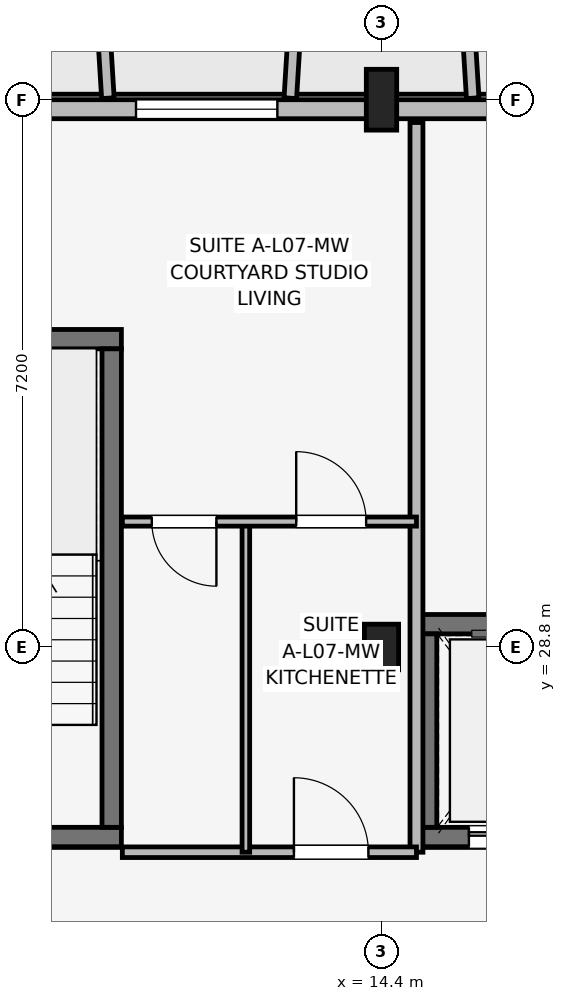
"""IFC4 building model, lengths in metres.
Left out: names, types, materials, properties, quantities, classifications, styles, units other than length and angle.
Written with IfcOpenShell. Run it as: python <this file> out.ifc"""

import sys

from ifc_helpers import new_model, si_unit, direction, frame, frame_2d, origin, origin_2d, place, context, subcontext, project, spatial, rectangle, extrude, element, fill, save


model = new_model("IFC4")
c1 = context("Model", 3, precision=1e-05, world=origin(), true_north=direction((0.0, 1.0)))
c2 = subcontext(c1, "Body", "Model", "MODEL_VIEW")
j1 = project(units=[si_unit("LENGTHUNIT", "METRE"), si_unit("PLANEANGLEUNIT", "RADIAN")], contexts=[c1])
p1 = place(None, origin())
s1 = spatial("IfcSite", under=j1, at=p1, CompositionType="ELEMENT")
p2 = place(p1, origin())
s2 = spatial("IfcBuilding", under=s1, at=p2, CompositionType="ELEMENT")
p3 = place(p2, frame((0.0, 0.0, 24.45)))
s3 = spatial("IfcBuildingStorey", under=s2, at=p3, CompositionType="ELEMENT", Elevation=24.45)
p4 = place(p3, frame((14.4, 28.8, 0.0), z_axis=(0.0, 0.0, 1.0), x_axis=(1.0, 0.0, 0.0)))
e1 = element("IfcColumn", 1, at=p4, inside=s3, PredefinedType="COLUMN", context=c2, shape_type="SweptSolid", body=[
    extrude(rectangle(XDim=0.45, YDim=0.6, at=origin_2d()), origin(), (0.0, 0.0, 1.0), 3.15),
])
p5 = place(p3, frame((14.4, 36.0, 0.0), z_axis=(0.0, 0.0, 1.0), x_axis=(1.0, 0.0, 0.0)))
e2 = element("IfcColumn", 2, at=p5, inside=s3, PredefinedType="COLUMN", context=c2, shape_type="SweptSolid", body=[
    extrude(rectangle(XDim=0.4, YDim=0.8, at=origin_2d()), origin(), (0.0, 0.0, 1.0), 3.15),
])
p6 = place(p3, frame((7.673, 26.3, 0.0), z_axis=(0.0, 0.0, 1.0), x_axis=(1.0, 0.0, 0.0)))
e3 = element("IfcWall", 3, at=p6, inside=s3, PredefinedType="SHEAR", context=c2, shape_type="SweptSolid", body=[
    extrude(rectangle(XDim=3.305, YDim=0.255, at=frame_2d((1.652, 0.0))), origin(), (0.0, 0.0, 1.0), 3.15),
])
p7 = place(p6, frame((2.177, 0.0, 0.0), z_axis=(0.0, 0.0, 1.0), x_axis=(-1.0, 0.0, 0.0)))
e4 = element("IfcOpeningElement", 4, at=p7, cuts=e3, PredefinedType="OPENING", context=c2, shape_type="SweptSolid", body=[
    extrude(rectangle(XDim=1.05, YDim=2.12, at=frame_2d((0.525, 1.06))), frame((0.0, 0.137, 0.0), z_axis=(0.0, -1.0, 0.0), x_axis=(1.0, 0.0, 0.0)), (0.0, 0.0, 1.0), 0.275),
])
p8 = place(p3, frame((7.673, 32.85, 0.0), z_axis=(0.0, 0.0, 1.0), x_axis=(1.0, 0.0, 0.0)))
e5 = element("IfcWall", 5, at=p8, inside=s3, PredefinedType="SHEAR", context=c2, shape_type="SweptSolid", body=[
    extrude(rectangle(XDim=3.305, YDim=0.255, at=frame_2d((1.652, 0.0))), origin(), (0.0, 0.0, 1.0), 3.15),
])
p9 = place(p3, frame((10.85, 26.427, 0.0), z_axis=(0.0, 0.0, 1.0), x_axis=(0.0, 1.0, 0.0)))
e6 = element("IfcWall", 6, at=p9, inside=s3, PredefinedType="SHEAR", context=c2, shape_type="SweptSolid", body=[
    extrude(rectangle(XDim=6.295, YDim=0.255, at=frame_2d((3.147, 0.0))), origin(), (0.0, 0.0, 1.0), 3.15),
])
p10 = place(p3, frame((14.873, 26.3, 0.0), z_axis=(0.0, 0.0, 1.0), x_axis=(1.0, 0.0, 0.0)))
e7 = element("IfcWall", 7, at=p10, inside=s3, PredefinedType="SHEAR", context=c2, shape_type="SweptSolid", body=[
    extrude(rectangle(XDim=2.455, YDim=0.255, at=frame_2d((1.228, 0.0))), origin(), (0.0, 0.0, 1.0), 3.15),
])
p11 = place(p10, frame((0.677, 0.0, 0.0)))
e8 = element("IfcOpeningElement", 8, at=p11, cuts=e7, PredefinedType="OPENING", context=c2, shape_type="SweptSolid", body=[
    extrude(rectangle(XDim=1.1, YDim=2.15, at=frame_2d((0.55, 1.075))), frame((0.0, 0.137, 0.0), z_axis=(0.0, -1.0, 0.0), x_axis=(1.0, 0.0, 0.0)), (0.0, 0.0, 1.0), 0.275),
])
p12 = place(p3, frame((14.873, 29.1, 0.0), z_axis=(0.0, 0.0, 1.0), x_axis=(1.0, 0.0, 0.0)))
e9 = element("IfcWall", 9, at=p12, inside=s3, PredefinedType="SHEAR", context=c2, shape_type="SweptSolid", body=[
    extrude(rectangle(XDim=2.455, YDim=0.255, at=frame_2d((1.228, 0.0))), origin(), (0.0, 0.0, 1.0), 3.15),
])
p13 = place(p3, frame((15.0, 26.427, 0.0), z_axis=(0.0, 0.0, 1.0), x_axis=(0.0, 1.0, 0.0)))
e10 = element("IfcWall", 10, at=p13, inside=s3, PredefinedType="SHEAR", context=c2, shape_type="SweptSolid", body=[
    extrude(rectangle(XDim=2.545, YDim=0.255, at=frame_2d((1.272, 0.0))), origin(), (0.0, 0.0, 1.0), 3.15),
])
p14 = place(p3, frame((32.6, 35.875, 0.0), z_axis=(0.0, 0.0, 1.0), x_axis=(-1.0, 0.0, 0.0)))
e11 = element("IfcWall", 11, at=p14, inside=s3, PredefinedType="SOLIDWALL", context=c2, shape_type="SweptSolid", body=[
    extrude(rectangle(XDim=29.2, YDim=0.25, at=frame_2d((14.6, 0.0))), origin(), (0.0, 0.0, 1.0), 2.43),
])
p15 = place(p14, frame((28.7, 0.0, 0.0), z_axis=(0.0, 0.0, 1.0), x_axis=(-1.0, 0.0, 0.0)))
e12 = element("IfcOpeningElement", 12, at=p15, cuts=e11, PredefinedType="OPENING", context=c2, shape_type="SweptSolid", body=[
    extrude(rectangle(XDim=1.8, YDim=2.15, at=frame_2d((0.9, 1.075))), frame((0.0, 0.135, 0.0), z_axis=(0.0, -1.0, 0.0), x_axis=(1.0, 0.0, 0.0)), (0.0, 0.0, 1.0), 0.27),
])
p16 = place(p14, frame((2.15, 0.0, 0.0), z_axis=(0.0, 0.0, 1.0), x_axis=(-1.0, 0.0, 0.0)))
e13 = element("IfcOpeningElement", 13, at=p16, cuts=e11, PredefinedType="OPENING", context=c2, shape_type="SweptSolid", body=[
    extrude(rectangle(XDim=1.5, YDim=2.15, at=frame_2d((0.75, 1.075))), frame((0.0, 0.135, 0.0), z_axis=(0.0, -1.0, 0.0), x_axis=(1.0, 0.0, 0.0)), (0.0, 0.0, 1.0), 0.27),
])
p17 = place(p14, frame((14.955, 0.0, 0.5)))
e14 = element("IfcOpeningElement", 14, at=p17, cuts=e11, PredefinedType="OPENING", context=c2, shape_type="SweptSolid", body=[
    extrude(rectangle(XDim=0.9, YDim=1.8, at=frame_2d((0.45, 0.9))), frame((0.0, 0.135, 0.0), z_axis=(0.0, -1.0, 0.0), x_axis=(1.0, 0.0, 0.0)), (0.0, 0.0, 1.0), 0.27),
])
p18 = place(p14, frame((7.745, 0.0, 0.7)))
e15 = element("IfcOpeningElement", 15, at=p18, cuts=e11, PredefinedType="OPENING", context=c2, shape_type="SweptSolid", body=[
    extrude(rectangle(XDim=1.86, YDim=1.6, at=frame_2d((0.93, 0.8))), frame((0.0, 0.135, 0.0), z_axis=(0.0, -1.0, 0.0), x_axis=(1.0, 0.0, 0.0)), (0.0, 0.0, 1.0), 0.27),
])
p19 = place(p14, frame((19.57, 0.0, 0.7)))
e16 = element("IfcOpeningElement", 16, at=p19, cuts=e11, PredefinedType="OPENING", context=c2, shape_type="SweptSolid", body=[
    extrude(rectangle(XDim=1.86, YDim=1.6, at=frame_2d((0.93, 0.8))), frame((0.0, 0.135, 0.0), z_axis=(0.0, -1.0, 0.0), x_axis=(1.0, 0.0, 0.0)), (0.0, 0.0, 1.0), 0.27),
])
for number, where, z_axis, x_axis in (
    (17, (10.8, 36.02, 0.0), (0.0, 0.0, 1.0), (-0.061, 0.998, 0.0)),
    (18, (13.2, 36.02, 0.0), (0.0, 0.0, 1.0), (0.061, 0.998, 0.0)),
):
    element("IfcWall", number, at=place(p3, frame(where, z_axis=z_axis, x_axis=x_axis)), inside=s3, PredefinedType="ELEMENTEDWALL", context=c2, shape_type="SweptSolid", body=[
        extrude(rectangle(XDim=1.964, YDim=0.165, at=frame_2d((0.982, 0.0))), origin(), (0.0, 0.0, 1.0), 2.53),
    ])
p20 = place(p3, frame((15.6, 36.02, 0.0), z_axis=(0.0, 0.0, 1.0), x_axis=(-0.061170732449, 0.998127317276, 0.0)))
e19 = element("IfcWall", 19, at=p20, inside=s3, PredefinedType="ELEMENTEDWALL", context=c2, shape_type="SweptSolid", body=[
    extrude(rectangle(XDim=1.964, YDim=0.165, at=frame_2d((0.982, 0.0))), origin(), (0.0, 0.0, 1.0), 2.55),
])
p21 = place(p3, frame((14.86, 26.1, 0.0), z_axis=(0.0, 0.0, 1.0), x_axis=(0.0, 1.0, 0.0)))
e20 = element("IfcWall", 20, at=p21, inside=s3, PredefinedType="PARTITIONING", context=c2, shape_type="SweptSolid", body=[
    extrude(rectangle(XDim=9.6, YDim=0.17, at=frame_2d((4.8, 0.0))), origin(), (0.0, 0.0, 1.0), 2.38),
])
p22 = place(p3, frame((10.99, 26.1, 0.0), z_axis=(0.0, 0.0, 1.0), x_axis=(1.0, 0.0, 0.0)))
e21 = element("IfcWall", 21, at=p22, inside=s3, PredefinedType="PARTITIONING", context=c2, shape_type="SweptSolid", body=[
    extrude(rectangle(XDim=3.87, YDim=0.14, at=frame_2d((1.935, 0.0))), origin(), (0.0, 0.0, 1.0), 2.38),
])
p23 = place(p22, frame((2.258, 0.0, 0.0)))
e22 = element("IfcOpeningElement", 22, at=p23, cuts=e21, PredefinedType="OPENING", context=c2, shape_type="SweptSolid", body=[
    extrude(rectangle(XDim=0.98, YDim=2.1, at=frame_2d((0.49, 1.05))), frame((0.0, 0.08, 0.0), z_axis=(0.0, -1.0, 0.0), x_axis=(1.0, 0.0, 0.0)), (0.0, 0.0, 1.0), 0.16),
])
p24 = place(p3, frame((12.615, 26.1, 0.0), z_axis=(0.0, 0.0, 1.0), x_axis=(0.0, 1.0, 0.0)))
e23 = element("IfcWall", 23, at=p24, inside=s3, PredefinedType="PARTITIONING", context=c2, shape_type="SweptSolid", body=[
    extrude(rectangle(XDim=4.35, YDim=0.1, at=frame_2d((2.175, 0.0))), origin(), (0.0, 0.0, 1.0), 2.38),
])
p25 = place(p3, frame((10.99, 30.45, 0.0), z_axis=(0.0, 0.0, 1.0), x_axis=(1.0, 0.0, 0.0)))
e24 = element("IfcWall", 24, at=p25, inside=s3, PredefinedType="PARTITIONING", context=c2, shape_type="SweptSolid", body=[
    extrude(rectangle(XDim=3.87, YDim=0.12, at=frame_2d((1.935, 0.0))), origin(), (0.0, 0.0, 1.0), 2.38),
])
p26 = place(p25, frame((1.238, 0.0, 0.0), z_axis=(0.0, 0.0, 1.0), x_axis=(-1.0, 0.0, 0.0)))
e25 = element("IfcOpeningElement", 25, at=p26, cuts=e24, PredefinedType="OPENING", context=c2, shape_type="SweptSolid", body=[
    extrude(rectangle(XDim=0.85, YDim=2.08, at=frame_2d((0.425, 1.04))), frame((0.0, 0.07, 0.0), z_axis=(0.0, -1.0, 0.0), x_axis=(1.0, 0.0, 0.0)), (0.0, 0.0, 1.0), 0.14),
])
p27 = place(p25, frame((2.288, 0.0, 0.0)))
e26 = element("IfcOpeningElement", 26, at=p27, cuts=e24, PredefinedType="OPENING", context=c2, shape_type="SweptSolid", body=[
    extrude(rectangle(XDim=0.92, YDim=2.08, at=frame_2d((0.46, 1.04))), frame((0.0, 0.07, 0.0), z_axis=(0.0, -1.0, 0.0), x_axis=(1.0, 0.0, 0.0)), (0.0, 0.0, 1.0), 0.14),
])
p28 = place(p19, origin())
e27 = element("IfcWindow", 27, at=p28, inside=s3, PartitioningType="SINGLE_PANEL", PredefinedType="WINDOW", context=c2, shape_type="SweptSolid", body=[
    extrude(rectangle(XDim=1.86, YDim=1.6, at=frame_2d((0.93, 0.8))), frame((0.0, 0.03, 0.0), z_axis=(0.0, -1.0, 0.0), x_axis=(1.0, 0.0, 0.0)), (0.0, 0.0, 1.0), 0.06),
])
fill(e16, e27)
p29 = place(p23, origin())
e28 = element("IfcDoor", 28, at=p29, inside=s3, OperationType="SINGLE_SWING_LEFT", PredefinedType="DOOR", context=c2, shape_type="SweptSolid", body=[
    extrude(rectangle(XDim=0.98, YDim=2.1, at=frame_2d((0.49, 1.05))), frame((0.0, 0.025, 0.0), z_axis=(0.0, -1.0, 0.0), x_axis=(1.0, 0.0, 0.0)), (0.0, 0.0, 1.0), 0.05),
])
fill(e22, e28)
p30 = place(p26, origin())
e29 = element("IfcDoor", 29, at=p30, inside=s3, OperationType="SINGLE_SWING_RIGHT", PredefinedType="DOOR", context=c2, shape_type="SweptSolid", body=[
    extrude(rectangle(XDim=0.85, YDim=2.08, at=frame_2d((0.425, 1.04))), frame((0.0, 0.025, 0.0), z_axis=(0.0, -1.0, 0.0), x_axis=(1.0, 0.0, 0.0)), (0.0, 0.0, 1.0), 0.05),
])
fill(e25, e29)
p31 = place(p27, origin())
e30 = element("IfcDoor", 30, at=p31, inside=s3, OperationType="SINGLE_SWING_LEFT", PredefinedType="DOOR", context=c2, shape_type="SweptSolid", body=[
    extrude(rectangle(XDim=0.92, YDim=2.08, at=frame_2d((0.46, 1.04))), frame((0.0, 0.025, 0.0), z_axis=(0.0, -1.0, 0.0), x_axis=(1.0, 0.0, 0.0)), (0.0, 0.0, 1.0), 0.05),
])
fill(e26, e30)
p32 = place(p11, origin())
e31 = element("IfcDoor", 31, at=p32, inside=s3, OperationType="SLIDING_TO_LEFT", PredefinedType="DOOR", context=c2, shape_type="SweptSolid", body=[
    extrude(rectangle(XDim=1.1, YDim=2.15, at=frame_2d((0.55, 1.075))), frame((0.0, 0.025, 0.0), z_axis=(0.0, -1.0, 0.0), x_axis=(1.0, 0.0, 0.0)), (0.0, 0.0, 1.0), 0.05),
])
fill(e8, e31)
save(model, sys.argv[1])
